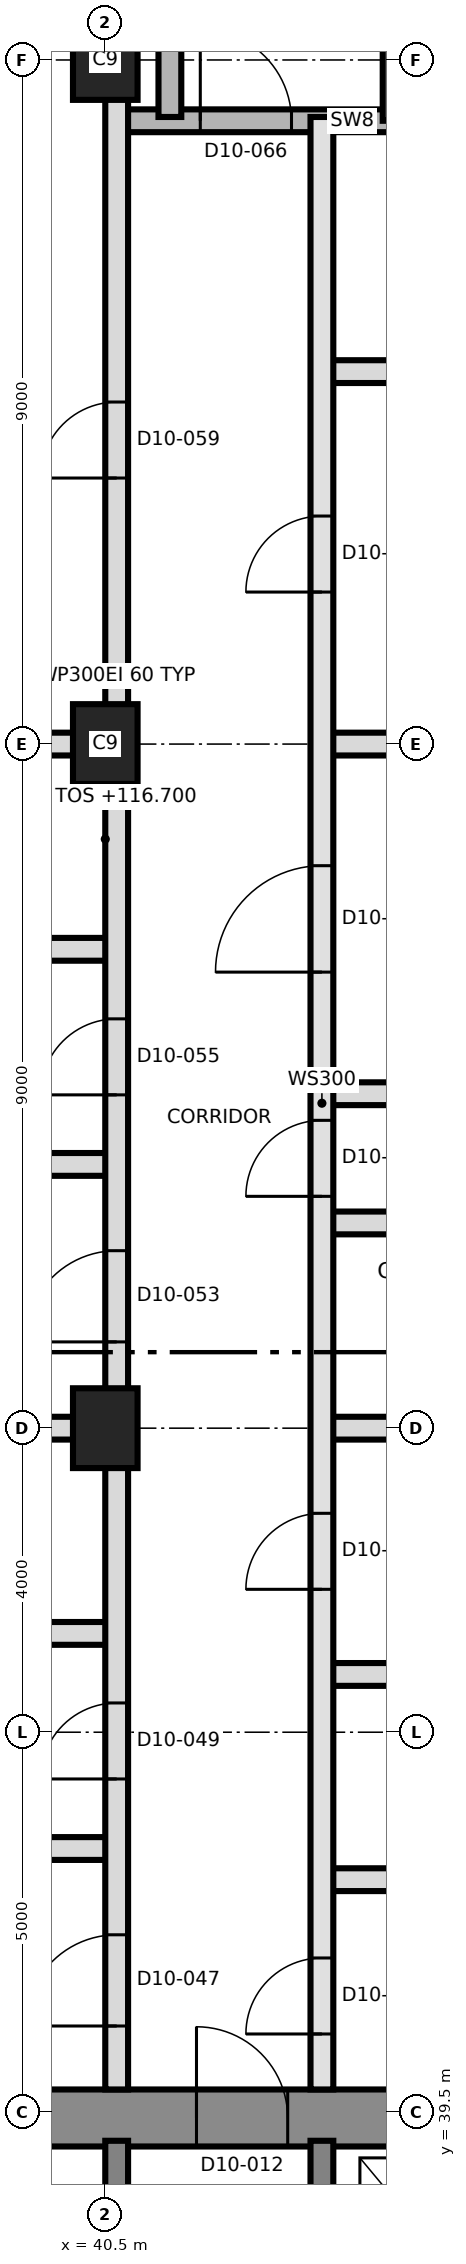
"""IFC4 building model, lengths in metres.
Left out: names, types, materials, properties, quantities, classifications, styles, units other than length and angle.
Written with IfcOpenShell. Run it as: python <this file> out.ifc"""

import sys

from ifc_helpers import new_model, si_unit, direction, frame, frame_2d, origin, origin_2d, place, context, subcontext, project, spatial, rectangle, extrude, element, fill, save


model = new_model("IFC4")
c1 = context("Model", 3, precision=1e-05, world=origin(), true_north=direction((0.0, 1.0)))
c2 = subcontext(c1, "Body", "Model", "MODEL_VIEW")
j1 = project(units=[si_unit("LENGTHUNIT", "METRE"), si_unit("PLANEANGLEUNIT", "RADIAN")], contexts=[c1])
p1 = place(None, origin())
s1 = spatial("IfcSite", under=j1, at=p1, CompositionType="ELEMENT")
p2 = place(p1, origin())
s2 = spatial("IfcBuilding", under=s1, at=p2, CompositionType="ELEMENT")
p3 = place(p2, frame((0.0, 0.0, 116.7)))
s3 = spatial("IfcBuildingStorey", under=s2, at=p3, CompositionType="ELEMENT", Elevation=116.7)
p4 = place(p3, frame((31.125, 39.425, 0.0), z_axis=(0.0, 0.0, 1.0), x_axis=(1.0, 0.0, 0.0)))
e1 = element("IfcWall", 1, at=p4, inside=s3, PredefinedType="SHEAR", context=c2, shape_type="SweptSolid", body=[
    extrude(rectangle(XDim=27.0, YDim=0.75, at=frame_2d((13.5, 0.0))), origin(), (0.0, 0.0, 1.0), 3.7),
])
p5 = place(p4, frame((10.575, 0.0, 0.0)))
e2 = element("IfcOpeningElement", 2, at=p5, cuts=e1, PredefinedType="OPENING", context=c2, shape_type="SweptSolid", body=[
    extrude(rectangle(XDim=1.2, YDim=2.1, at=frame_2d((0.6, 1.05))), frame((0.0, 0.385, 0.0), z_axis=(0.0, -1.0, 0.0), x_axis=(1.0, 0.0, 0.0)), (0.0, 0.0, 1.0), 0.77),
])
for number, where, z_axis, x_axis in (
    (3, (40.65, 33.5, 0.0), (0.0, 0.0, 1.0), (0.0, 1.0, 0.0)),
    (4, (43.35, 33.5, 0.0), (0.0, 0.0, 1.0), (0.0, 1.0, 0.0)),
):
    element("IfcWall", number, at=place(p3, frame(where, z_axis=z_axis, x_axis=x_axis)), inside=s3, PredefinedType="SHEAR", context=c2, shape_type="SweptSolid", body=[
        extrude(rectangle(XDim=5.625, YDim=0.3, at=frame_2d((2.812, 0.0))), origin(), (0.0, 0.0, 1.0), 3.7),
    ])
for number, where, z_axis, x_axis in (
    (5, (40.5, 48.5, 0.0), (0.0, 0.0, 1.0), (0.0, 1.0, 0.0)),
    (6, (40.5, 57.5, 0.0), (0.0, 0.0, 1.0), (0.0, 1.0, 0.0)),
    (7, (40.5, 66.5, 0.0), (0.0, 0.0, 1.0), (0.0, 1.0, 0.0)),
):
    element("IfcColumn", number, at=place(p3, frame(where, z_axis=z_axis, x_axis=x_axis)), inside=s3, PredefinedType="COLUMN", context=c2, shape_type="SweptSolid", body=[
        extrude(rectangle(XDim=1.05, YDim=0.85, at=origin_2d()), origin(), (0.0, 0.0, 1.0), 3.7),
    ])
p6 = place(p3, frame((43.35, 42.56, 0.0), z_axis=(0.0, 0.0, 1.0), x_axis=(1.0, 0.0, 0.0)))
e8 = element("IfcWall", 8, at=p6, inside=s3, PredefinedType="PARTITIONING", context=c2, shape_type="SweptSolid", body=[
    extrude(rectangle(XDim=3.2, YDim=0.3, at=frame_2d((1.6, 0.0))), origin(), (0.0, 0.0, 1.0), 3.4),
])
p7 = place(p3, frame((29.275, 42.97, 0.0), z_axis=(0.0, 0.0, 1.0), x_axis=(1.0, 0.0, 0.0)))
e9 = element("IfcWall", 9, at=p7, inside=s3, PredefinedType="PARTITIONING", context=c2, shape_type="SweptSolid", body=[
    extrude(rectangle(XDim=11.375, YDim=0.3, at=frame_2d((5.688, 0.0))), origin(), (0.0, 0.0, 1.0), 3.4),
])
p8 = place(p3, frame((43.35, 45.26, 0.0), z_axis=(0.0, 0.0, 1.0), x_axis=(1.0, 0.0, 0.0)))
e10 = element("IfcWall", 10, at=p8, inside=s3, PredefinedType="PARTITIONING", context=c2, shape_type="SweptSolid", body=[
    extrude(rectangle(XDim=8.676, YDim=0.3, at=frame_2d((4.338, 0.0))), origin(), (0.0, 0.0, 1.0), 3.4),
])
p9 = place(p3, frame((37.45, 45.8, 0.0), z_axis=(0.0, 0.0, 1.0), x_axis=(1.0, 0.0, 0.0)))
e11 = element("IfcWall", 11, at=p9, inside=s3, PredefinedType="PARTITIONING", context=c2, shape_type="SweptSolid", body=[
    extrude(rectangle(XDim=3.2, YDim=0.3, at=frame_2d((1.6, 0.0))), origin(), (0.0, 0.0, 1.0), 3.4),
])
p10 = place(p3, frame((29.275, 48.5, 0.0), z_axis=(0.0, 0.0, 1.0), x_axis=(1.0, 0.0, 0.0)))
e12 = element("IfcWall", 12, at=p10, inside=s3, PredefinedType="PARTITIONING", context=c2, shape_type="SweptSolid", body=[
    extrude(rectangle(XDim=11.375, YDim=0.3, at=frame_2d((5.688, 0.0))), origin(), (0.0, 0.0, 1.0), 3.4),
])
p11 = place(p3, frame((43.35, 48.5, 0.0), z_axis=(0.0, 0.0, 1.0), x_axis=(1.0, 0.0, 0.0)))
e13 = element("IfcWall", 13, at=p11, inside=s3, PredefinedType="PARTITIONING", context=c2, shape_type="SweptSolid", body=[
    extrude(rectangle(XDim=8.555, YDim=0.3, at=frame_2d((4.277, 0.0))), origin(), (0.0, 0.0, 1.0), 3.4),
])
p12 = place(p3, frame((43.35, 51.2, 0.0), z_axis=(0.0, 0.0, 1.0), x_axis=(1.0, 0.0, 0.0)))
e14 = element("IfcWall", 14, at=p12, inside=s3, PredefinedType="PARTITIONING", context=c2, shape_type="SweptSolid", body=[
    extrude(rectangle(XDim=3.2, YDim=0.3, at=frame_2d((1.6, 0.0))), origin(), (0.0, 0.0, 1.0), 3.4),
])
p13 = place(p3, frame((29.275, 51.97, 0.0), z_axis=(0.0, 0.0, 1.0), x_axis=(1.0, 0.0, 0.0)))
e15 = element("IfcWall", 15, at=p13, inside=s3, PredefinedType="PARTITIONING", context=c2, shape_type="SweptSolid", body=[
    extrude(rectangle(XDim=11.375, YDim=0.3, at=frame_2d((5.688, 0.0))), origin(), (0.0, 0.0, 1.0), 3.4),
])
p14 = place(p3, frame((43.35, 52.9, 0.0), z_axis=(0.0, 0.0, 1.0), x_axis=(1.0, 0.0, 0.0)))
e16 = element("IfcWall", 16, at=p14, inside=s3, PredefinedType="PARTITIONING", context=c2, shape_type="SweptSolid", body=[
    extrude(rectangle(XDim=8.555, YDim=0.3, at=frame_2d((4.277, 0.0))), origin(), (0.0, 0.0, 1.0), 3.4),
])
p15 = place(p3, frame((37.45, 54.8, 0.0), z_axis=(0.0, 0.0, 1.0), x_axis=(1.0, 0.0, 0.0)))
e17 = element("IfcWall", 17, at=p15, inside=s3, PredefinedType="PARTITIONING", context=c2, shape_type="SweptSolid", body=[
    extrude(rectangle(XDim=3.2, YDim=0.3, at=frame_2d((1.6, 0.0))), origin(), (0.0, 0.0, 1.0), 3.4),
])
p16 = place(p3, frame((29.275, 57.5, 0.0), z_axis=(0.0, 0.0, 1.0), x_axis=(1.0, 0.0, 0.0)))
e18 = element("IfcWall", 18, at=p16, inside=s3, PredefinedType="PARTITIONING", context=c2, shape_type="SweptSolid", body=[
    extrude(rectangle(XDim=11.375, YDim=0.3, at=frame_2d((5.688, 0.0))), origin(), (0.0, 0.0, 1.0), 3.4),
])
p17 = place(p3, frame((43.35, 57.5, 0.0), z_axis=(0.0, 0.0, 1.0), x_axis=(1.0, 0.0, 0.0)))
e19 = element("IfcWall", 19, at=p17, inside=s3, PredefinedType="PARTITIONING", context=c2, shape_type="SweptSolid", body=[
    extrude(rectangle(XDim=8.555, YDim=0.3, at=frame_2d((4.277, 0.0))), origin(), (0.0, 0.0, 1.0), 3.4),
])
p18 = place(p3, frame((43.35, 62.4, 0.0), z_axis=(0.0, 0.0, 1.0), x_axis=(1.0, 0.0, 0.0)))
e20 = element("IfcWall", 20, at=p18, inside=s3, PredefinedType="PARTITIONING", context=c2, shape_type="SweptSolid", body=[
    extrude(rectangle(XDim=8.555, YDim=0.3, at=frame_2d((4.277, 0.0))), origin(), (0.0, 0.0, 1.0), 3.4),
])
p19 = place(p18, frame((4.65, 0.0, 0.0)))
e21 = element("IfcOpeningElement", 21, at=p19, cuts=e20, PredefinedType="OPENING", context=c2, shape_type="SweptSolid", body=[
    extrude(rectangle(XDim=1.0, YDim=2.1, at=frame_2d((0.5, 1.05))), frame((0.0, 0.16, 0.0), z_axis=(0.0, -1.0, 0.0), x_axis=(1.0, 0.0, 0.0)), (0.0, 0.0, 1.0), 0.32),
])
p20 = place(p3, frame((40.65, 65.7, 0.0), z_axis=(0.0, 0.0, 1.0), x_axis=(1.0, 0.0, 0.0)))
e22 = element("IfcWall", 22, at=p20, inside=s3, PredefinedType="SHEAR", context=c2, shape_type="SweptSolid", body=[
    extrude(rectangle(XDim=6.2, YDim=0.3, at=frame_2d((3.1, 0.0))), origin(), (0.0, 0.0, 1.0), 3.4),
])
p21 = place(p20, frame((1.1, 0.0, 0.0)))
e23 = element("IfcOpeningElement", 23, at=p21, cuts=e22, PredefinedType="OPENING", context=c2, shape_type="SweptSolid", body=[
    extrude(rectangle(XDim=1.2, YDim=2.1, at=frame_2d((0.6, 1.05))), frame((0.0, 0.16, 0.0), z_axis=(0.0, -1.0, 0.0), x_axis=(1.0, 0.0, 0.0)), (0.0, 0.0, 1.0), 0.32),
])
p22 = place(p3, frame((40.65, 39.8, 0.0), z_axis=(0.0, 0.0, 1.0), x_axis=(0.0, 1.0, 0.0)))
e24 = element("IfcWall", 24, at=p22, inside=s3, PredefinedType="PARTITIONING", context=c2, shape_type="SweptSolid", body=[
    extrude(rectangle(XDim=37.2, YDim=0.3, at=frame_2d((18.6, 0.0))), origin(), (0.0, 0.0, 1.0), 3.4),
])
p23 = place(p22, frame((0.835, 0.0, 0.0)))
e25 = element("IfcOpeningElement", 25, at=p23, cuts=e24, PredefinedType="OPENING", context=c2, shape_type="SweptSolid", body=[
    extrude(rectangle(XDim=1.2, YDim=2.1, at=frame_2d((0.6, 1.05))), frame((0.0, 0.16, 0.0), z_axis=(0.0, -1.0, 0.0), x_axis=(1.0, 0.0, 0.0)), (0.0, 0.0, 1.0), 0.32),
])
p24 = place(p22, frame((4.085, 0.0, 0.0)))
e26 = element("IfcOpeningElement", 26, at=p24, cuts=e24, PredefinedType="OPENING", context=c2, shape_type="SweptSolid", body=[
    extrude(rectangle(XDim=1.0, YDim=2.1, at=frame_2d((0.5, 1.05))), frame((0.0, 0.16, 0.0), z_axis=(0.0, -1.0, 0.0), x_axis=(1.0, 0.0, 0.0)), (0.0, 0.0, 1.0), 0.32),
])
p25 = place(p22, frame((9.835, 0.0, 0.0)))
e27 = element("IfcOpeningElement", 27, at=p25, cuts=e24, PredefinedType="OPENING", context=c2, shape_type="SweptSolid", body=[
    extrude(rectangle(XDim=1.2, YDim=2.1, at=frame_2d((0.6, 1.05))), frame((0.0, 0.16, 0.0), z_axis=(0.0, -1.0, 0.0), x_axis=(1.0, 0.0, 0.0)), (0.0, 0.0, 1.0), 0.32),
])
p26 = place(p22, frame((13.085, 0.0, 0.0)))
e28 = element("IfcOpeningElement", 28, at=p26, cuts=e24, PredefinedType="OPENING", context=c2, shape_type="SweptSolid", body=[
    extrude(rectangle(XDim=1.0, YDim=2.1, at=frame_2d((0.5, 1.05))), frame((0.0, 0.16, 0.0), z_axis=(0.0, -1.0, 0.0), x_axis=(1.0, 0.0, 0.0)), (0.0, 0.0, 1.0), 0.32),
])
p27 = place(p22, frame((21.2, 0.0, 0.0)))
e29 = element("IfcOpeningElement", 29, at=p27, cuts=e24, PredefinedType="OPENING", context=c2, shape_type="SweptSolid", body=[
    extrude(rectangle(XDim=1.0, YDim=2.4, at=frame_2d((0.5, 1.2))), frame((0.0, 0.16, 0.0), z_axis=(0.0, -1.0, 0.0), x_axis=(1.0, 0.0, 0.0)), (0.0, 0.0, 1.0), 0.32),
])
p28 = place(p3, frame((41.35, 65.75, 0.0), z_axis=(0.0, 0.0, 1.0), x_axis=(0.0, 1.0, 0.0)))
e30 = element("IfcWall", 30, at=p28, inside=s3, PredefinedType="SHEAR", context=c2, shape_type="SweptSolid", body=[
    extrude(rectangle(XDim=8.85, YDim=0.3, at=frame_2d((4.425, 0.0))), origin(), (0.0, 0.0, 1.0), 3.4),
])
p29 = place(p3, frame((43.35, 39.8, 0.0), z_axis=(0.0, 0.0, 1.0), x_axis=(0.0, 1.0, 0.0)))
e31 = element("IfcWall", 31, at=p29, inside=s3, PredefinedType="SOLIDWALL", context=c2, shape_type="SweptSolid", body=[
    extrude(rectangle(XDim=25.95, YDim=0.3, at=frame_2d((12.975, 0.0))), origin(), (0.0, 0.0, 1.0), 3.4),
])
p30 = place(p29, frame((0.73, 0.0, 0.0)))
e32 = element("IfcOpeningElement", 32, at=p30, cuts=e31, PredefinedType="OPENING", context=c2, shape_type="SweptSolid", body=[
    extrude(rectangle(XDim=1.0, YDim=2.1, at=frame_2d((0.5, 1.05))), frame((0.0, 0.16, 0.0), z_axis=(0.0, -1.0, 0.0), x_axis=(1.0, 0.0, 0.0)), (0.0, 0.0, 1.0), 0.32),
])
p31 = place(p29, frame((6.58, 0.0, 0.0)))
e33 = element("IfcOpeningElement", 33, at=p31, cuts=e31, PredefinedType="OPENING", context=c2, shape_type="SweptSolid", body=[
    extrude(rectangle(XDim=1.0, YDim=2.1, at=frame_2d((0.5, 1.05))), frame((0.0, 0.16, 0.0), z_axis=(0.0, -1.0, 0.0), x_axis=(1.0, 0.0, 0.0)), (0.0, 0.0, 1.0), 0.32),
])
p32 = place(p29, frame((11.75, 0.0, 0.0)))
e34 = element("IfcOpeningElement", 34, at=p32, cuts=e31, PredefinedType="OPENING", context=c2, shape_type="SweptSolid", body=[
    extrude(rectangle(XDim=1.0, YDim=2.1, at=frame_2d((0.5, 1.05))), frame((0.0, 0.16, 0.0), z_axis=(0.0, -1.0, 0.0), x_axis=(1.0, 0.0, 0.0)), (0.0, 0.0, 1.0), 0.32),
])
p33 = place(p29, frame((14.7, 0.0, 0.0)))
e35 = element("IfcOpeningElement", 35, at=p33, cuts=e31, PredefinedType="OPENING", context=c2, shape_type="SweptSolid", body=[
    extrude(rectangle(XDim=1.4, YDim=2.1, at=frame_2d((0.7, 1.05))), frame((0.0, 0.16, 0.0), z_axis=(0.0, -1.0, 0.0), x_axis=(1.0, 0.0, 0.0)), (0.0, 0.0, 1.0), 0.32),
])
p34 = place(p29, frame((19.7, 0.0, 0.0)))
e36 = element("IfcOpeningElement", 36, at=p34, cuts=e31, PredefinedType="OPENING", context=c2, shape_type="SweptSolid", body=[
    extrude(rectangle(XDim=1.0, YDim=2.4, at=frame_2d((0.5, 1.2))), frame((0.0, 0.16, 0.0), z_axis=(0.0, -1.0, 0.0), x_axis=(1.0, 0.0, 0.0)), (0.0, 0.0, 1.0), 0.32),
])
p35 = place(p3, frame((44.3, 65.7, 0.0), z_axis=(0.0, 0.0, 1.0), x_axis=(0.0, 1.0, 0.0)))
e37 = element("IfcWall", 37, at=p35, inside=s3, PredefinedType="SHEAR", context=c2, shape_type="SweptSolid", body=[
    extrude(rectangle(XDim=8.9, YDim=0.3, at=frame_2d((4.45, 0.0))), origin(), (0.0, 0.0, 1.0), 3.4),
])
p36 = place(p5, origin())
e38 = element("IfcDoor", 38, at=p36, inside=s3, OperationType="SINGLE_SWING_RIGHT", PredefinedType="DOOR", context=c2, shape_type="SweptSolid", body=[
    extrude(rectangle(XDim=1.2, YDim=2.1, at=frame_2d((0.6, 1.05))), frame((0.0, 0.025, 0.0), z_axis=(0.0, -1.0, 0.0), x_axis=(1.0, 0.0, 0.0)), (0.0, 0.0, 1.0), 0.05),
])
fill(e2, e38)
p37 = place(p30, origin())
e39 = element("IfcDoor", 39, at=p37, inside=s3, OperationType="SINGLE_SWING_LEFT", PredefinedType="DOOR", context=c2, shape_type="SweptSolid", body=[
    extrude(rectangle(XDim=1.0, YDim=2.1, at=frame_2d((0.5, 1.05))), frame((0.0, 0.025, 0.0), z_axis=(0.0, -1.0, 0.0), x_axis=(1.0, 0.0, 0.0)), (0.0, 0.0, 1.0), 0.05),
])
fill(e32, e39)
p38 = place(p31, origin())
e40 = element("IfcDoor", 40, at=p38, inside=s3, OperationType="SINGLE_SWING_RIGHT", PredefinedType="DOOR", context=c2, shape_type="SweptSolid", body=[
    extrude(rectangle(XDim=1.0, YDim=2.1, at=frame_2d((0.5, 1.05))), frame((0.0, 0.025, 0.0), z_axis=(0.0, -1.0, 0.0), x_axis=(1.0, 0.0, 0.0)), (0.0, 0.0, 1.0), 0.05),
])
fill(e33, e40)
p39 = place(p23, origin())
e41 = element("IfcDoor", 41, at=p39, inside=s3, OperationType="SINGLE_SWING_LEFT", PredefinedType="DOOR", context=c2, shape_type="SweptSolid", body=[
    extrude(rectangle(XDim=1.2, YDim=2.1, at=frame_2d((0.6, 1.05))), frame((0.0, 0.025, 0.0), z_axis=(0.0, -1.0, 0.0), x_axis=(1.0, 0.0, 0.0)), (0.0, 0.0, 1.0), 0.05),
])
fill(e25, e41)
p40 = place(p24, origin())
e42 = element("IfcDoor", 42, at=p40, inside=s3, OperationType="SINGLE_SWING_LEFT", PredefinedType="DOOR", context=c2, shape_type="SweptSolid", body=[
    extrude(rectangle(XDim=1.0, YDim=2.1, at=frame_2d((0.5, 1.05))), frame((0.0, 0.025, 0.0), z_axis=(0.0, -1.0, 0.0), x_axis=(1.0, 0.0, 0.0)), (0.0, 0.0, 1.0), 0.05),
])
fill(e26, e42)
p41 = place(p32, origin())
e43 = element("IfcDoor", 43, at=p41, inside=s3, OperationType="SINGLE_SWING_LEFT", PredefinedType="DOOR", context=c2, shape_type="SweptSolid", body=[
    extrude(rectangle(XDim=1.0, YDim=2.1, at=frame_2d((0.5, 1.05))), frame((0.0, 0.025, 0.0), z_axis=(0.0, -1.0, 0.0), x_axis=(1.0, 0.0, 0.0)), (0.0, 0.0, 1.0), 0.05),
])
fill(e34, e43)
p42 = place(p33, origin())
e44 = element("IfcDoor", 44, at=p42, inside=s3, OperationType="SINGLE_SWING_RIGHT", PredefinedType="DOOR", context=c2, shape_type="SweptSolid", body=[
    extrude(rectangle(XDim=1.4, YDim=2.1, at=frame_2d((0.7, 1.05))), frame((0.0, 0.025, 0.0), z_axis=(0.0, -1.0, 0.0), x_axis=(1.0, 0.0, 0.0)), (0.0, 0.0, 1.0), 0.05),
])
fill(e35, e44)
p43 = place(p25, origin())
e45 = element("IfcDoor", 45, at=p43, inside=s3, OperationType="SINGLE_SWING_LEFT", PredefinedType="DOOR", context=c2, shape_type="SweptSolid", body=[
    extrude(rectangle(XDim=1.2, YDim=2.1, at=frame_2d((0.6, 1.05))), frame((0.0, 0.025, 0.0), z_axis=(0.0, -1.0, 0.0), x_axis=(1.0, 0.0, 0.0)), (0.0, 0.0, 1.0), 0.05),
])
fill(e27, e45)
p44 = place(p26, origin())
e46 = element("IfcDoor", 46, at=p44, inside=s3, OperationType="SINGLE_SWING_LEFT", PredefinedType="DOOR", context=c2, shape_type="SweptSolid", body=[
    extrude(rectangle(XDim=1.0, YDim=2.1, at=frame_2d((0.5, 1.05))), frame((0.0, 0.025, 0.0), z_axis=(0.0, -1.0, 0.0), x_axis=(1.0, 0.0, 0.0)), (0.0, 0.0, 1.0), 0.05),
])
fill(e28, e46)
p45 = place(p34, origin())
e47 = element("IfcDoor", 47, at=p45, inside=s3, OperationType="SINGLE_SWING_LEFT", PredefinedType="DOOR", context=c2, shape_type="SweptSolid", body=[
    extrude(rectangle(XDim=1.0, YDim=2.4, at=frame_2d((0.5, 1.2))), frame((0.0, 0.025, 0.0), z_axis=(0.0, -1.0, 0.0), x_axis=(1.0, 0.0, 0.0)), (0.0, 0.0, 1.0), 0.05),
])
fill(e36, e47)
p46 = place(p27, origin())
e48 = element("IfcDoor", 48, at=p46, inside=s3, OperationType="SINGLE_SWING_LEFT", PredefinedType="DOOR", context=c2, shape_type="SweptSolid", body=[
    extrude(rectangle(XDim=1.0, YDim=2.4, at=frame_2d((0.5, 1.2))), frame((0.0, 0.025, 0.0), z_axis=(0.0, -1.0, 0.0), x_axis=(1.0, 0.0, 0.0)), (0.0, 0.0, 1.0), 0.05),
])
fill(e29, e48)
p47 = place(p21, origin())
e49 = element("IfcDoor", 49, at=p47, inside=s3, OperationType="SINGLE_SWING_RIGHT", PredefinedType="DOOR", context=c2, shape_type="SweptSolid", body=[
    extrude(rectangle(XDim=1.2, YDim=2.1, at=frame_2d((0.6, 1.05))), frame((0.0, 0.025, 0.0), z_axis=(0.0, -1.0, 0.0), x_axis=(1.0, 0.0, 0.0)), (0.0, 0.0, 1.0), 0.05),
])
fill(e23, e49)
save(model, sys.argv[1])
